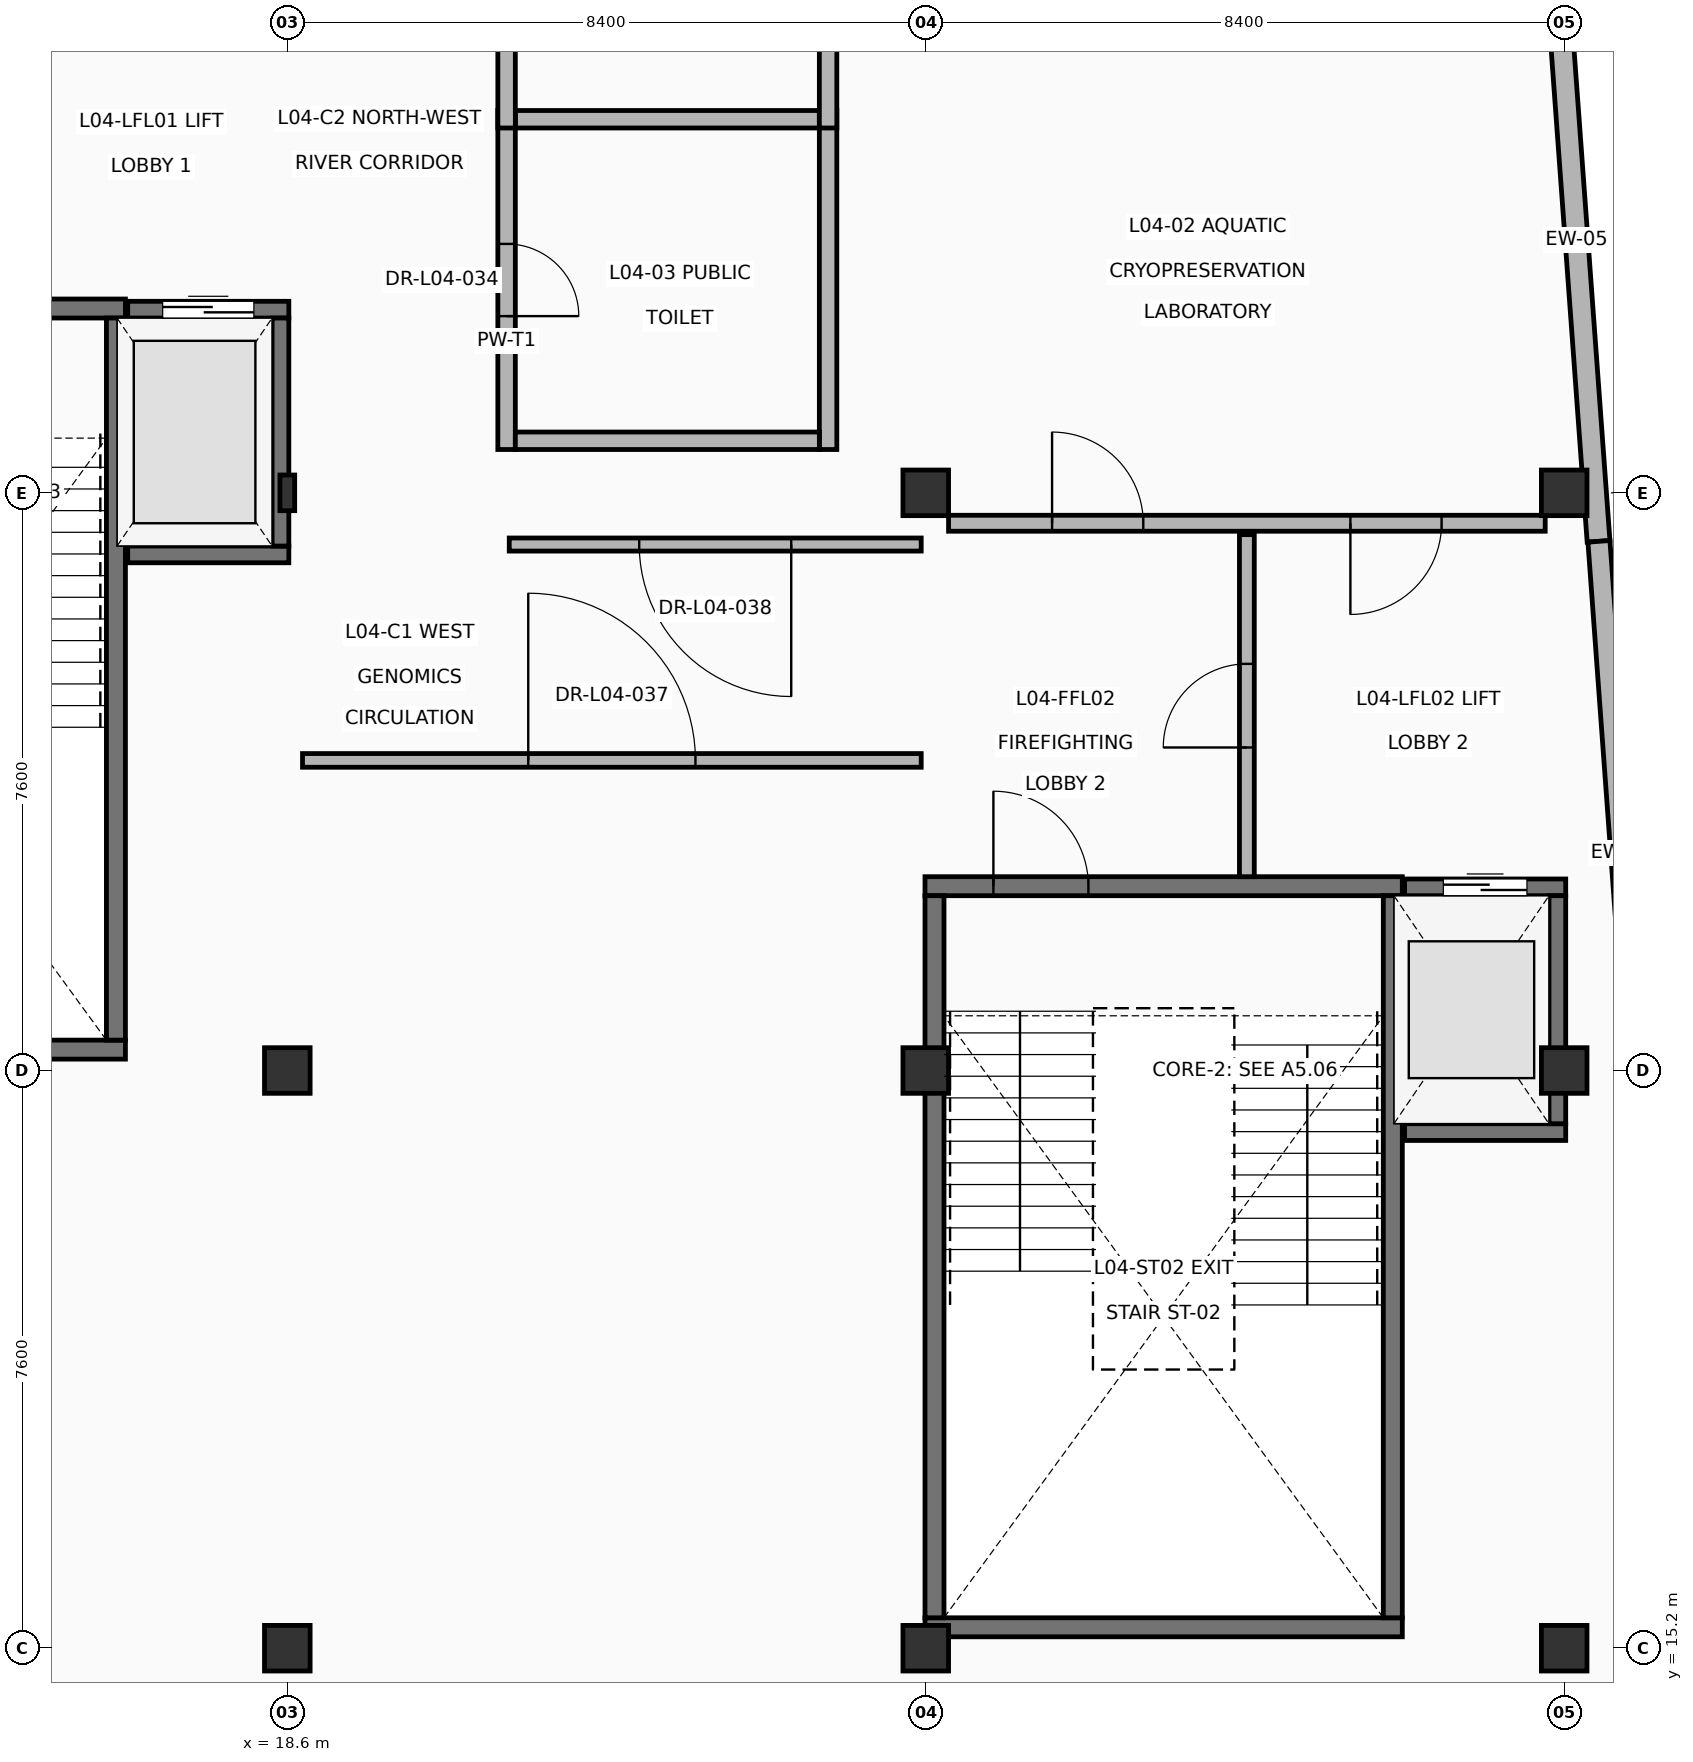
"""IFC4 building model, lengths in metres.
Left out: names, types, materials, properties, quantities, classifications, styles, units other than length and angle.
Written with IfcOpenShell. Run it as: python <this file> out.ifc"""

import sys

from ifc_helpers import new_model, si_unit, direction, frame, frame_2d, origin, origin_2d, place, context, subcontext, project, spatial, rectangle, i_section, extrude, element, fill, save


model = new_model("IFC4")
c1 = context("Model", 3, precision=1e-05, world=origin(), true_north=direction((0.0, 1.0)))
c2 = subcontext(c1, "Body", "Model", "MODEL_VIEW")
j1 = project(units=[si_unit("LENGTHUNIT", "METRE"), si_unit("PLANEANGLEUNIT", "RADIAN")], contexts=[c1])
p1 = place(None, origin())
s1 = spatial("IfcSite", under=j1, at=p1, CompositionType="ELEMENT")
p2 = place(p1, origin())
s2 = spatial("IfcBuilding", under=s1, at=p2, CompositionType="ELEMENT")
p3 = place(p2, frame((0.0, 0.0, 15.3)))
s3 = spatial("IfcBuildingStorey", under=s2, at=p3, CompositionType="ELEMENT", Elevation=15.3)
for number, where, z_axis, x_axis in (
    (1, (18.6, 15.2, 0.0), (0.0, 0.0, 1.0), (1.0, 0.0, 0.0)),
    (2, (18.6, 22.8, 0.0), (0.0, 0.0, 1.0), (1.0, 0.0, 0.0)),
):
    element("IfcColumn", number, at=place(p3, frame(where, z_axis=z_axis, x_axis=x_axis)), inside=s3, PredefinedType="COLUMN", context=c2, shape_type="SweptSolid", body=[
        extrude(rectangle(XDim=0.6, YDim=0.6, at=origin_2d()), origin(), (0.0, 0.0, 1.0), 4.5),
    ])
p4 = place(p3, frame((18.6, 30.4, 0.0), z_axis=(0.0, 0.0, 1.0), x_axis=(1.0, 0.0, 0.0)))
e3 = element("IfcColumn", 3, at=p4, inside=s3, PredefinedType="COLUMN", context=c2, shape_type="SweptSolid", body=[
    extrude(i_section(OverallWidth=0.194, OverallDepth=0.469, WebThickness=0.013, FlangeThickness=0.021, at=origin_2d()), origin(), (0.0, 0.0, 1.0), 4.5),
])
for number, where, z_axis, x_axis in (
    (4, (27.0, 15.2, 0.0), (0.0, 0.0, 1.0), (1.0, 0.0, 0.0)),
    (5, (27.0, 22.8, 0.0), (0.0, 0.0, 1.0), (1.0, 0.0, 0.0)),
    (6, (27.0, 30.4, 0.0), (0.0, 0.0, 1.0), (1.0, 0.0, 0.0)),
    (7, (35.4, 15.2, 0.0), (0.0, 0.0, 1.0), (1.0, 0.0, 0.0)),
    (8, (35.4, 22.8, 0.0), (0.0, 0.0, 1.0), (1.0, 0.0, 0.0)),
    (9, (35.4, 30.4, 0.0), (0.0, 0.0, 1.0), (1.0, 0.0, 0.0)),
):
    element("IfcColumn", number, at=place(p3, frame(where, z_axis=z_axis, x_axis=x_axis)), inside=s3, PredefinedType="COLUMN", context=c2, shape_type="SweptSolid", body=[
        extrude(rectangle(XDim=0.6, YDim=0.6, at=origin_2d()), origin(), (0.0, 0.0, 1.0), 4.5),
    ])
p5 = place(p3, frame((35.273, 37.684, 0.0), z_axis=(0.0, 0.0, 1.0), x_axis=(0.072904800795, -0.997338904295, 0.0)))
e10 = element("IfcWall", 10, at=p5, inside=s3, PredefinedType="SOLIDWALL", context=c2, shape_type="SweptSolid", body=[
    extrude(rectangle(XDim=7.943, YDim=0.3, at=frame_2d((3.972, 0.0))), origin(), (0.0, 0.0, 1.0), 3.816),
])
p6 = place(p3, frame((35.857, 29.762, 0.0), z_axis=(0.0, 0.0, 1.0), x_axis=(0.072933886696, -0.997336777709, 0.0)))
e11 = element("IfcWall", 11, at=p6, inside=s3, PredefinedType="SOLIDWALL", context=c2, shape_type="SweptSolid", body=[
    extrude(rectangle(XDim=8.228, YDim=0.29, at=frame_2d((4.114, 0.0))), origin(), (0.0, 0.0, 1.0), 4.29),
])
p7 = place(p3, frame((10.19, 23.075, 0.0), z_axis=(0.0, 0.0, 1.0), x_axis=(1.0, 0.0, 0.0)))
e12 = element("IfcWall", 12, at=p7, inside=s3, PredefinedType="SHEAR", context=c2, shape_type="SweptSolid", body=[
    extrude(rectangle(XDim=6.28, YDim=0.25, at=frame_2d((3.14, 0.0))), origin(), (0.0, 0.0, 1.0), 4.29),
])
p8 = place(p3, frame((10.19, 32.825, 0.0), z_axis=(0.0, 0.0, 1.0), x_axis=(1.0, 0.0, 0.0)))
e13 = element("IfcWall", 13, at=p8, inside=s3, PredefinedType="SHEAR", context=c2, shape_type="SweptSolid", body=[
    extrude(rectangle(XDim=6.28, YDim=0.25, at=frame_2d((3.14, 0.0))), origin(), (0.0, 0.0, 1.0), 4.29),
])
p9 = place(p8, frame((0.9, 0.0, 0.0)))
e14 = element("IfcOpeningElement", 14, at=p9, cuts=e13, PredefinedType="OPENING", context=c2, shape_type="SweptSolid", body=[
    extrude(rectangle(XDim=1.25, YDim=2.2, at=frame_2d((0.625, 1.1))), frame((0.0, 0.135, 0.0), z_axis=(0.0, -1.0, 0.0), x_axis=(1.0, 0.0, 0.0)), (0.0, 0.0, 1.0), 0.27),
])
p10 = place(p3, frame((16.345, 23.2, 0.0), z_axis=(0.0, 0.0, 1.0), x_axis=(0.0, 1.0, 0.0)))
e15 = element("IfcWall", 15, at=p10, inside=s3, PredefinedType="SHEAR", context=c2, shape_type="SweptSolid", body=[
    extrude(rectangle(XDim=9.5, YDim=0.25, at=frame_2d((4.75, 0.0))), origin(), (0.0, 0.0, 1.0), 4.29),
])
p11 = place(p3, frame((16.5, 29.59, 0.0), z_axis=(0.0, 0.0, 1.0), x_axis=(1.0, 0.0, 0.0)))
e16 = element("IfcWall", 16, at=p11, inside=s3, PredefinedType="SHEAR", context=c2, shape_type="SweptSolid", body=[
    extrude(rectangle(XDim=2.12, YDim=0.22, at=frame_2d((1.06, 0.0))), origin(), (0.0, 0.0, 1.0), 4.29),
])
p12 = place(p3, frame((16.5, 32.81, 0.0), z_axis=(0.0, 0.0, 1.0), x_axis=(1.0, 0.0, 0.0)))
e17 = element("IfcWall", 17, at=p12, inside=s3, PredefinedType="SHEAR", context=c2, shape_type="SweptSolid", body=[
    extrude(rectangle(XDim=2.12, YDim=0.22, at=frame_2d((1.06, 0.0))), origin(), (0.0, 0.0, 1.0), 4.29),
])
p13 = place(p12, frame((0.46, 0.0, 0.0)))
e18 = element("IfcOpeningElement", 18, at=p13, cuts=e17, PredefinedType="OPENING", context=c2, shape_type="SweptSolid", body=[
    extrude(rectangle(XDim=1.2, YDim=2.2, at=frame_2d((0.6, 1.1))), frame((0.0, 0.12, 0.0), z_axis=(0.0, -1.0, 0.0), x_axis=(1.0, 0.0, 0.0)), (0.0, 0.0, 1.0), 0.24),
])
p14 = place(p3, frame((18.51, 29.7, 0.0), z_axis=(0.0, 0.0, 1.0), x_axis=(0.0, 1.0, 0.0)))
e19 = element("IfcWall", 19, at=p14, inside=s3, PredefinedType="SHEAR", context=c2, shape_type="SweptSolid", body=[
    extrude(rectangle(XDim=3.0, YDim=0.22, at=frame_2d((1.5, 0.0))), origin(), (0.0, 0.0, 1.0), 4.29),
])
p15 = place(p3, frame((26.99, 15.475, 0.0), z_axis=(0.0, 0.0, 1.0), x_axis=(1.0, 0.0, 0.0)))
e20 = element("IfcWall", 20, at=p15, inside=s3, PredefinedType="SHEAR", context=c2, shape_type="SweptSolid", body=[
    extrude(rectangle(XDim=6.28, YDim=0.25, at=frame_2d((3.14, 0.0))), origin(), (0.0, 0.0, 1.0), 4.29),
])
p16 = place(p3, frame((26.99, 25.225, 0.0), z_axis=(0.0, 0.0, 1.0), x_axis=(1.0, 0.0, 0.0)))
e21 = element("IfcWall", 21, at=p16, inside=s3, PredefinedType="SHEAR", context=c2, shape_type="SweptSolid", body=[
    extrude(rectangle(XDim=6.28, YDim=0.25, at=frame_2d((3.14, 0.0))), origin(), (0.0, 0.0, 1.0), 4.29),
])
p17 = place(p16, frame((0.9, 0.0, 0.0)))
e22 = element("IfcOpeningElement", 22, at=p17, cuts=e21, PredefinedType="OPENING", context=c2, shape_type="SweptSolid", body=[
    extrude(rectangle(XDim=1.25, YDim=2.2, at=frame_2d((0.625, 1.1))), frame((0.0, 0.135, 0.0), z_axis=(0.0, -1.0, 0.0), x_axis=(1.0, 0.0, 0.0)), (0.0, 0.0, 1.0), 0.27),
])
for number, where, z_axis, x_axis in (
    (23, (27.115, 15.6, 0.0), (0.0, 0.0, 1.0), (0.0, 1.0, 0.0)),
    (24, (33.145, 15.6, 0.0), (0.0, 0.0, 1.0), (0.0, 1.0, 0.0)),
):
    element("IfcWall", number, at=place(p3, frame(where, z_axis=z_axis, x_axis=x_axis)), inside=s3, PredefinedType="SHEAR", context=c2, shape_type="SweptSolid", body=[
        extrude(rectangle(XDim=9.5, YDim=0.25, at=frame_2d((4.75, 0.0))), origin(), (0.0, 0.0, 1.0), 4.29),
    ])
p18 = place(p3, frame((33.3, 21.99, 0.0), z_axis=(0.0, 0.0, 1.0), x_axis=(1.0, 0.0, 0.0)))
e25 = element("IfcWall", 25, at=p18, inside=s3, PredefinedType="SHEAR", context=c2, shape_type="SweptSolid", body=[
    extrude(rectangle(XDim=2.12, YDim=0.22, at=frame_2d((1.06, 0.0))), origin(), (0.0, 0.0, 1.0), 4.29),
])
p19 = place(p3, frame((33.3, 25.21, 0.0), z_axis=(0.0, 0.0, 1.0), x_axis=(1.0, 0.0, 0.0)))
e26 = element("IfcWall", 26, at=p19, inside=s3, PredefinedType="SHEAR", context=c2, shape_type="SweptSolid", body=[
    extrude(rectangle(XDim=2.12, YDim=0.22, at=frame_2d((1.06, 0.0))), origin(), (0.0, 0.0, 1.0), 4.29),
])
p20 = place(p19, frame((0.51, 0.0, 0.0)))
e27 = element("IfcOpeningElement", 27, at=p20, cuts=e26, PredefinedType="OPENING", context=c2, shape_type="SweptSolid", body=[
    extrude(rectangle(XDim=1.1, YDim=2.15, at=frame_2d((0.55, 1.075))), frame((0.0, 0.12, 0.0), z_axis=(0.0, -1.0, 0.0), x_axis=(1.0, 0.0, 0.0)), (0.0, 0.0, 1.0), 0.24),
])
p21 = place(p3, frame((35.31, 22.1, 0.0), z_axis=(0.0, 0.0, 1.0), x_axis=(0.0, 1.0, 0.0)))
e28 = element("IfcWall", 28, at=p21, inside=s3, PredefinedType="SHEAR", context=c2, shape_type="SweptSolid", body=[
    extrude(rectangle(XDim=3.0, YDim=0.22, at=frame_2d((1.5, 0.0))), origin(), (0.0, 0.0, 1.0), 4.29),
])
p22 = place(p3, frame((27.3, 30.0, 0.0), z_axis=(0.0, 0.0, 1.0), x_axis=(1.0, 0.0, 0.0)))
e29 = element("IfcWall", 29, at=p22, inside=s3, PredefinedType="PARTITIONING", context=c2, shape_type="SweptSolid", body=[
    extrude(rectangle(XDim=7.85, YDim=0.21, at=frame_2d((3.925, 0.0))), origin(), (0.0, 0.0, 1.0), 4.29),
])
p23 = place(p22, frame((1.362, 0.0, 0.0)))
e30 = element("IfcOpeningElement", 30, at=p23, cuts=e29, PredefinedType="OPENING", context=c2, shape_type="SweptSolid", body=[
    extrude(rectangle(XDim=1.2, YDim=2.2, at=frame_2d((0.6, 1.1))), frame((0.0, 0.115, 0.0), z_axis=(0.0, -1.0, 0.0), x_axis=(1.0, 0.0, 0.0)), (0.0, 0.0, 1.0), 0.23),
])
p24 = place(p22, frame((5.287, 0.0, 0.0)))
e31 = element("IfcOpeningElement", 31, at=p24, cuts=e29, PredefinedType="OPENING", context=c2, shape_type="SweptSolid", body=[
    extrude(rectangle(XDim=1.2, YDim=2.2, at=frame_2d((0.6, 1.1))), frame((0.0, 0.115, 0.0), z_axis=(0.0, -1.0, 0.0), x_axis=(1.0, 0.0, 0.0)), (0.0, 0.0, 1.0), 0.23),
])
p25 = place(p3, frame((31.225, 25.35, 0.0), z_axis=(0.0, 0.0, 1.0), x_axis=(0.0, 1.0, 0.0)))
e32 = element("IfcWall", 32, at=p25, inside=s3, PredefinedType="PARTITIONING", context=c2, shape_type="SweptSolid", body=[
    extrude(rectangle(XDim=4.5, YDim=0.195, at=frame_2d((2.25, 0.0))), origin(), (0.0, 0.0, 1.0), 4.29),
])
p26 = place(p25, frame((1.7, 0.0, 0.0)))
e33 = element("IfcOpeningElement", 33, at=p26, cuts=e32, PredefinedType="OPENING", context=c2, shape_type="SweptSolid", body=[
    extrude(rectangle(XDim=1.1, YDim=2.15, at=frame_2d((0.55, 1.075))), frame((0.0, 0.107, 0.0), z_axis=(0.0, -1.0, 0.0), x_axis=(1.0, 0.0, 0.0)), (0.0, 0.0, 1.0), 0.215),
])
p27 = place(p3, frame((21.485, 30.97, 0.0), z_axis=(0.0, 0.0, 1.0), x_axis=(0.0, 1.0, 0.0)))
e34 = element("IfcWall", 34, at=p27, inside=s3, PredefinedType="PLUMBINGWALL", context=c2, shape_type="SweptSolid", body=[
    extrude(rectangle(XDim=4.46, YDim=0.23, at=frame_2d((2.23, 0.0))), origin(), (0.0, 0.0, 1.0), 4.29),
])
p28 = place(p27, frame((1.755, 0.0, 0.0)))
e35 = element("IfcOpeningElement", 35, at=p28, cuts=e34, PredefinedType="OPENING", context=c2, shape_type="SweptSolid", body=[
    extrude(rectangle(XDim=0.95, YDim=2.1, at=frame_2d((0.475, 1.05))), frame((0.0, 0.125, 0.0), z_axis=(0.0, -1.0, 0.0), x_axis=(1.0, 0.0, 0.0)), (0.0, 0.0, 1.0), 0.25),
])
p29 = place(p3, frame((25.715, 30.97, 0.0), z_axis=(0.0, 0.0, 1.0), x_axis=(0.0, 1.0, 0.0)))
e36 = element("IfcWall", 36, at=p29, inside=s3, PredefinedType="PLUMBINGWALL", context=c2, shape_type="SweptSolid", body=[
    extrude(rectangle(XDim=4.46, YDim=0.23, at=frame_2d((2.23, 0.0))), origin(), (0.0, 0.0, 1.0), 4.29),
])
for number, where, z_axis, x_axis in (
    (37, (21.6, 31.085, 0.0), (0.0, 0.0, 1.0), (1.0, 0.0, 0.0)),
    (38, (21.6, 35.315, 0.0), (0.0, 0.0, 1.0), (1.0, 0.0, 0.0)),
):
    element("IfcWall", number, at=place(p3, frame(where, z_axis=z_axis, x_axis=x_axis)), inside=s3, PredefinedType="PLUMBINGWALL", context=c2, shape_type="SweptSolid", body=[
        extrude(rectangle(XDim=4.0, YDim=0.23, at=frame_2d((2.0, 0.0))), origin(), (0.0, 0.0, 1.0), 3.931),
    ])
p30 = place(p3, frame((21.485, 35.2, 0.0), z_axis=(0.0, 0.0, 1.0), x_axis=(0.0, 1.0, 0.0)))
e39 = element("IfcWall", 39, at=p30, inside=s3, PredefinedType="PLUMBINGWALL", context=c2, shape_type="SweptSolid", body=[
    extrude(rectangle(XDim=4.46, YDim=0.23, at=frame_2d((2.23, 0.0))), origin(), (0.0, 0.0, 1.0), 3.741),
])
p31 = place(p30, frame((1.705, 0.0, 0.0)))
e40 = element("IfcOpeningElement", 40, at=p31, cuts=e39, PredefinedType="OPENING", context=c2, shape_type="SweptSolid", body=[
    extrude(rectangle(XDim=1.05, YDim=2.1, at=frame_2d((0.525, 1.05))), frame((0.0, 0.125, 0.0), z_axis=(0.0, -1.0, 0.0), x_axis=(1.0, 0.0, 0.0)), (0.0, 0.0, 1.0), 0.25),
])
p32 = place(p3, frame((25.715, 35.2, 0.0), z_axis=(0.0, 0.0, 1.0), x_axis=(0.0, 1.0, 0.0)))
e41 = element("IfcWall", 41, at=p32, inside=s3, PredefinedType="PLUMBINGWALL", context=c2, shape_type="SweptSolid", body=[
    extrude(rectangle(XDim=4.46, YDim=0.23, at=frame_2d((2.23, 0.0))), origin(), (0.0, 0.0, 1.0), 3.741),
])
p33 = place(p3, frame((18.8, 26.88, 0.0), z_axis=(0.0, 0.0, 1.0), x_axis=(1.0, 0.0, 0.0)))
e42 = element("IfcWall", 42, at=p33, inside=s3, PredefinedType="PARTITIONING", context=c2, shape_type="SweptSolid", body=[
    extrude(rectangle(XDim=8.14, YDim=0.18, at=frame_2d((4.07, 0.0))), origin(), (0.0, 0.0, 1.0), 3.816),
])
p34 = place(p33, frame((2.97, 0.0, 0.0)))
e43 = element("IfcOpeningElement", 43, at=p34, cuts=e42, PredefinedType="OPENING", context=c2, shape_type="SweptSolid", body=[
    extrude(rectangle(XDim=2.2, YDim=2.45, at=frame_2d((1.1, 1.225))), frame((0.0, 0.1, 0.0), z_axis=(0.0, -1.0, 0.0), x_axis=(1.0, 0.0, 0.0)), (0.0, 0.0, 1.0), 0.2),
])
p35 = place(p3, frame((26.94, 29.72, 0.0), z_axis=(0.0, 0.0, 1.0), x_axis=(-1.0, 0.0, 0.0)))
e44 = element("IfcWall", 44, at=p35, inside=s3, PredefinedType="PARTITIONING", context=c2, shape_type="SweptSolid", body=[
    extrude(rectangle(XDim=5.42, YDim=0.172, at=frame_2d((2.71, 0.0))), origin(), (0.0, 0.0, 1.0), 3.816),
])
p36 = place(p35, frame((1.71, 0.0, 0.0)))
e45 = element("IfcOpeningElement", 45, at=p36, cuts=e44, PredefinedType="OPENING", context=c2, shape_type="SweptSolid", body=[
    extrude(rectangle(XDim=2.0, YDim=2.4, at=frame_2d((1.0, 1.2))), frame((0.0, 0.096, 0.0), z_axis=(0.0, -1.0, 0.0), x_axis=(1.0, 0.0, 0.0)), (0.0, 0.0, 1.0), 0.192),
])
p37 = place(p13, origin())
e46 = element("IfcDoor", 46, at=p37, inside=s3, OperationType="DOUBLE_DOOR_SLIDING", PredefinedType="DOOR", context=c2, shape_type="SweptSolid", body=[
    extrude(rectangle(XDim=1.2, YDim=2.2, at=frame_2d((0.6, 1.1))), frame((0.0, 0.025, 0.0), z_axis=(0.0, -1.0, 0.0), x_axis=(1.0, 0.0, 0.0)), (0.0, 0.0, 1.0), 0.05),
])
fill(e18, e46)
p38 = place(p17, origin())
e47 = element("IfcDoor", 47, at=p38, inside=s3, OperationType="SINGLE_SWING_LEFT", PredefinedType="DOOR", context=c2, shape_type="SweptSolid", body=[
    extrude(rectangle(XDim=1.25, YDim=2.2, at=frame_2d((0.625, 1.1))), frame((0.0, 0.025, 0.0), z_axis=(0.0, -1.0, 0.0), x_axis=(1.0, 0.0, 0.0)), (0.0, 0.0, 1.0), 0.05),
])
fill(e22, e47)
p39 = place(p20, origin())
e48 = element("IfcDoor", 48, at=p39, inside=s3, OperationType="DOUBLE_DOOR_SLIDING", PredefinedType="DOOR", context=c2, shape_type="SweptSolid", body=[
    extrude(rectangle(XDim=1.1, YDim=2.15, at=frame_2d((0.55, 1.075))), frame((0.0, 0.025, 0.0), z_axis=(0.0, -1.0, 0.0), x_axis=(1.0, 0.0, 0.0)), (0.0, 0.0, 1.0), 0.05),
])
fill(e27, e48)
p40 = place(p23, origin())
e49 = element("IfcDoor", 49, at=p40, inside=s3, OperationType="SINGLE_SWING_LEFT", PredefinedType="DOOR", context=c2, shape_type="SweptSolid", body=[
    extrude(rectangle(XDim=1.2, YDim=2.2, at=frame_2d((0.6, 1.1))), frame((0.0, 0.025, 0.0), z_axis=(0.0, -1.0, 0.0), x_axis=(1.0, 0.0, 0.0)), (0.0, 0.0, 1.0), 0.05),
])
fill(e30, e49)
p41 = place(p24, origin())
e50 = element("IfcDoor", 50, at=p41, inside=s3, OperationType="SINGLE_SWING_RIGHT", PredefinedType="DOOR", context=c2, shape_type="SweptSolid", body=[
    extrude(rectangle(XDim=1.2, YDim=2.2, at=frame_2d((0.6, 1.1))), frame((0.0, 0.025, 0.0), z_axis=(0.0, -1.0, 0.0), x_axis=(1.0, 0.0, 0.0)), (0.0, 0.0, 1.0), 0.05),
])
fill(e31, e50)
p42 = place(p26, origin())
e51 = element("IfcDoor", 51, at=p42, inside=s3, OperationType="SINGLE_SWING_LEFT", PredefinedType="DOOR", context=c2, shape_type="SweptSolid", body=[
    extrude(rectangle(XDim=1.1, YDim=2.15, at=frame_2d((0.55, 1.075))), frame((0.0, 0.025, 0.0), z_axis=(0.0, -1.0, 0.0), x_axis=(1.0, 0.0, 0.0)), (0.0, 0.0, 1.0), 0.05),
])
fill(e33, e51)
p43 = place(p28, origin())
e52 = element("IfcDoor", 52, at=p43, inside=s3, OperationType="SINGLE_SWING_RIGHT", PredefinedType="DOOR", context=c2, shape_type="SweptSolid", body=[
    extrude(rectangle(XDim=0.95, YDim=2.1, at=frame_2d((0.475, 1.05))), frame((0.0, 0.025, 0.0), z_axis=(0.0, -1.0, 0.0), x_axis=(1.0, 0.0, 0.0)), (0.0, 0.0, 1.0), 0.05),
])
fill(e35, e52)
p44 = place(p34, origin())
e53 = element("IfcDoor", 53, at=p44, inside=s3, OperationType="DOUBLE_DOOR_SINGLE_SWING", PredefinedType="DOOR", context=c2, shape_type="SweptSolid", body=[
    extrude(rectangle(XDim=2.2, YDim=2.45, at=frame_2d((1.1, 1.225))), frame((0.0, 0.025, 0.0), z_axis=(0.0, -1.0, 0.0), x_axis=(1.0, 0.0, 0.0)), (0.0, 0.0, 1.0), 0.05),
])
fill(e43, e53)
p45 = place(p36, origin())
e54 = element("IfcDoor", 54, at=p45, inside=s3, OperationType="DOUBLE_DOOR_SINGLE_SWING", PredefinedType="DOOR", context=c2, shape_type="SweptSolid", body=[
    extrude(rectangle(XDim=2.0, YDim=2.4, at=frame_2d((1.0, 1.2))), frame((0.0, 0.025, 0.0), z_axis=(0.0, -1.0, 0.0), x_axis=(1.0, 0.0, 0.0)), (0.0, 0.0, 1.0), 0.05),
])
fill(e45, e54)
save(model, sys.argv[1])
